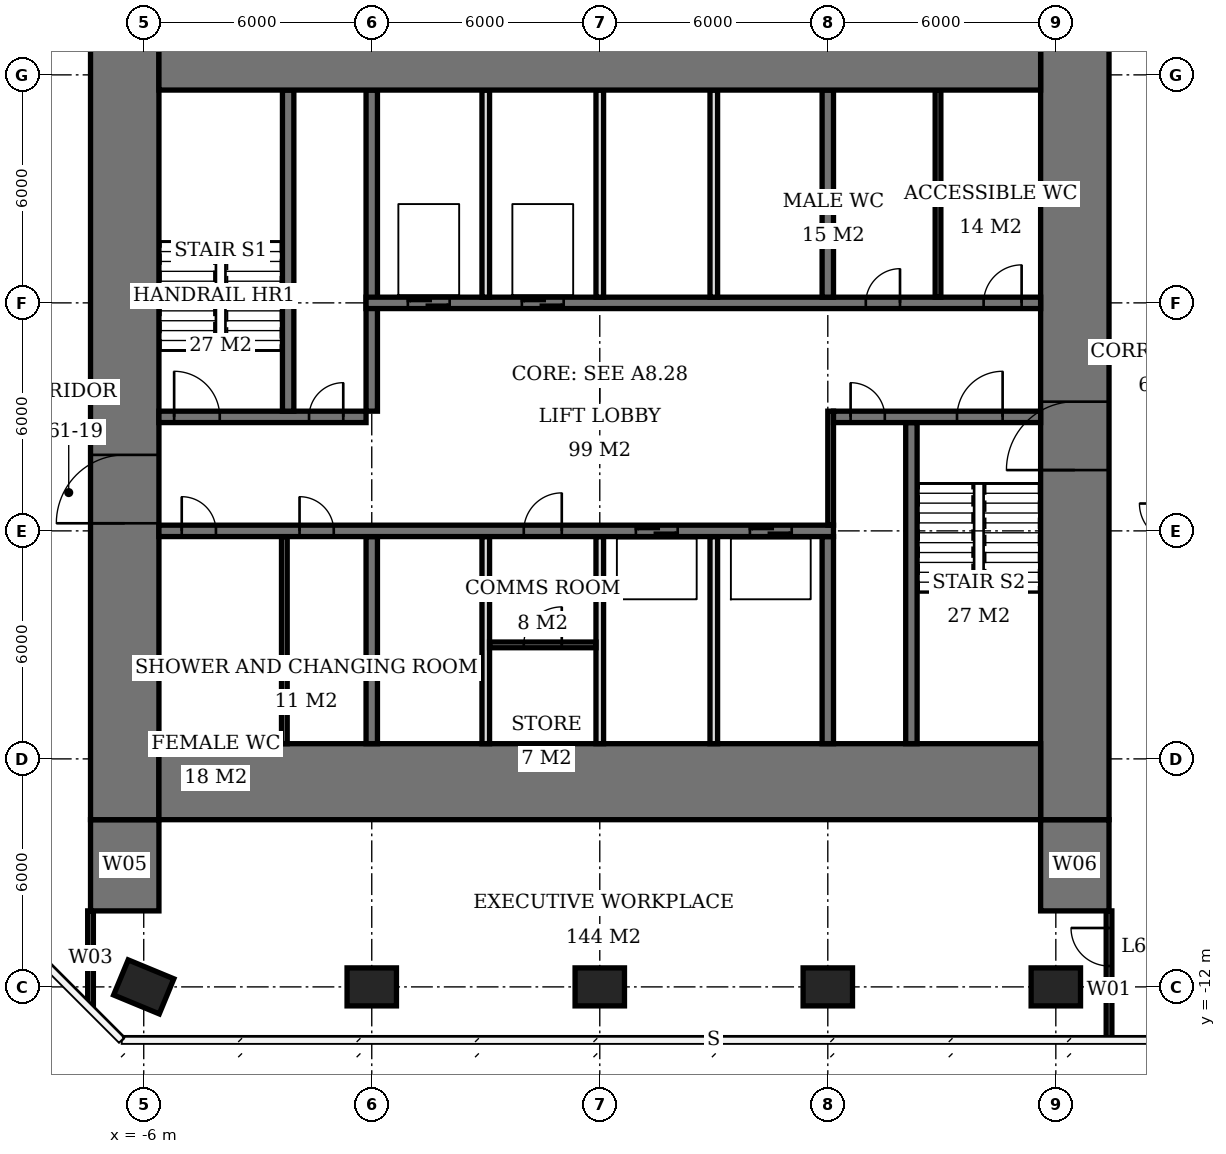
"""IFC4 building model, lengths in metres.
Left out: names, types, materials, properties, quantities, classifications, styles, units other than length and angle.
Written with IfcOpenShell. Run it as: python <this file> out.ifc"""

import sys

from ifc_helpers import new_model, si_unit, direction, frame, frame_2d, origin, origin_2d, place, context, subcontext, project, spatial, rectangle, extrude, element, fill, save


model = new_model("IFC4")
c1 = context("Model", 3, precision=1e-05, world=origin(), true_north=direction((0.0, 1.0)))
c2 = subcontext(c1, "Body", "Model", "MODEL_VIEW")
j1 = project(units=[si_unit("LENGTHUNIT", "METRE"), si_unit("PLANEANGLEUNIT", "RADIAN")], contexts=[c1])
p1 = place(None, origin())
s1 = spatial("IfcSite", under=j1, at=p1, CompositionType="ELEMENT")
p2 = place(p1, origin())
s2 = spatial("IfcBuilding", under=s1, at=p2, CompositionType="ELEMENT")
p3 = place(p2, frame((0.0, 0.0, 248.9)))
s3 = spatial("IfcBuildingStorey", under=s2, at=p3, CompositionType="ELEMENT", Elevation=248.9)
for number, where, z_axis, x_axis in (
    (1, (-6.0, -12.0, 0.0), (0.0, 0.0, 1.0), (-0.924, 0.383, 0.0)),
    (2, (0.0, -12.0, 0.0), (0.0, 0.0, 1.0), (1.0, 0.0, 0.0)),
    (3, (6.0, -12.0, 0.0), (0.0, 0.0, 1.0), (1.0, 0.0, 0.0)),
    (4, (12.0, -12.0, 0.0), (0.0, 0.0, 1.0), (1.0, 0.0, 0.0)),
    (5, (18.0, -12.0, 0.0), (0.0, 0.0, 1.0), (1.0, 0.0, 0.0)),
):
    element("IfcColumn", number, at=place(p3, frame(where, z_axis=z_axis, x_axis=x_axis)), inside=s3, PredefinedType="COLUMN", context=c2, shape_type="SweptSolid", body=[
        extrude(rectangle(XDim=1.3, YDim=1.0, at=origin_2d()), origin(), (0.0, 0.0, 1.0), 3.9),
    ])
for number, where, z_axis, x_axis in (
    (6, (-5.6, -6.6, 0.0), (0.0, 0.0, 1.0), (1.0, 0.0, 0.0)),
    (7, (-5.6, 12.6, 0.0), (0.0, 0.0, 1.0), (1.0, 0.0, 0.0)),
):
    element("IfcWall", number, at=place(p3, frame(where, z_axis=z_axis, x_axis=x_axis)), inside=s3, PredefinedType="SHEAR", context=c2, shape_type="SweptSolid", body=[
        extrude(rectangle(XDim=23.2, YDim=2.0, at=frame_2d((11.6, 0.0))), origin(), (0.0, 0.0, 1.0), 3.9),
    ])
p4 = place(p3, frame((-6.5, -7.6, 0.0), z_axis=(0.0, 0.0, 1.0), x_axis=(0.0, 1.0, 0.0)))
e8 = element("IfcWall", 8, at=p4, inside=s3, PredefinedType="SHEAR", context=c2, shape_type="SweptSolid", body=[
    extrude(rectangle(XDim=21.2, YDim=1.8, at=frame_2d((10.6, 0.0))), origin(), (0.0, 0.0, 1.0), 3.9),
])
p5 = place(p4, frame((7.8, 0.0, 0.0)))
e9 = element("IfcOpeningElement", 9, at=p5, cuts=e8, PredefinedType="OPENING", context=c2, shape_type="SweptSolid", body=[
    extrude(rectangle(XDim=1.8, YDim=2.4, at=frame_2d((0.9, 1.2))), frame((0.0, 0.91, 0.0), z_axis=(0.0, -1.0, 0.0), x_axis=(1.0, 0.0, 0.0)), (0.0, 0.0, 1.0), 1.82),
])
p6 = place(p3, frame((18.5, -7.6, 0.0), z_axis=(0.0, 0.0, 1.0), x_axis=(0.0, 1.0, 0.0)))
e10 = element("IfcWall", 10, at=p6, inside=s3, PredefinedType="SHEAR", context=c2, shape_type="SweptSolid", body=[
    extrude(rectangle(XDim=21.2, YDim=1.8, at=frame_2d((10.6, 0.0))), origin(), (0.0, 0.0, 1.0), 3.9),
])
p7 = place(p6, frame((9.2, 0.0, 0.0)))
e11 = element("IfcOpeningElement", 11, at=p7, cuts=e10, PredefinedType="OPENING", context=c2, shape_type="SweptSolid", body=[
    extrude(rectangle(XDim=1.8, YDim=2.4, at=frame_2d((0.9, 1.2))), frame((0.0, 0.91, 0.0), z_axis=(0.0, -1.0, 0.0), x_axis=(1.0, 0.0, 0.0)), (0.0, 0.0, 1.0), 1.82),
])
for number, where, z_axis, x_axis in (
    (12, (-6.5, -10.0, 0.0), (0.0, 0.0, 1.0), (0.0, 1.0, 0.0)),
    (13, (18.5, -10.0, 0.0), (0.0, 0.0, 1.0), (0.0, 1.0, 0.0)),
):
    element("IfcWall", number, at=place(p3, frame(where, z_axis=z_axis, x_axis=x_axis)), inside=s3, PredefinedType="SHEAR", context=c2, shape_type="SweptSolid", body=[
        extrude(rectangle(XDim=2.4, YDim=1.8, at=frame_2d((1.2, 0.0))), origin(), (0.0, 0.0, 1.0), 3.9),
    ])
p8 = place(p3, frame((-5.6, 0.0, 0.0), z_axis=(0.0, 0.0, 1.0), x_axis=(1.0, 0.0, 0.0)))
e14 = element("IfcWall", 14, at=p8, inside=s3, PredefinedType="SHEAR", context=c2, shape_type="SweptSolid", body=[
    extrude(rectangle(XDim=17.75, YDim=0.3, at=frame_2d((8.875, 0.0))), origin(), (0.0, 0.0, 1.0), 3.9),
])
p9 = place(p8, frame((0.6, 0.0, 0.0)))
e15 = element("IfcOpeningElement", 15, at=p9, cuts=e14, PredefinedType="OPENING", context=c2, shape_type="SweptSolid", body=[
    extrude(rectangle(XDim=0.9, YDim=2.1, at=frame_2d((0.45, 1.05))), frame((0.0, 0.16, 0.0), z_axis=(0.0, -1.0, 0.0), x_axis=(1.0, 0.0, 0.0)), (0.0, 0.0, 1.0), 0.32),
])
p10 = place(p8, frame((3.7, 0.0, 0.0)))
e16 = element("IfcOpeningElement", 16, at=p10, cuts=e14, PredefinedType="OPENING", context=c2, shape_type="SweptSolid", body=[
    extrude(rectangle(XDim=0.9, YDim=2.1, at=frame_2d((0.45, 1.05))), frame((0.0, 0.16, 0.0), z_axis=(0.0, -1.0, 0.0), x_axis=(1.0, 0.0, 0.0)), (0.0, 0.0, 1.0), 0.32),
])
p11 = place(p8, frame((9.6, 0.0, 0.0)))
e17 = element("IfcOpeningElement", 17, at=p11, cuts=e14, PredefinedType="OPENING", context=c2, shape_type="SweptSolid", body=[
    extrude(rectangle(XDim=1.0, YDim=2.1, at=frame_2d((0.5, 1.05))), frame((0.0, 0.16, 0.0), z_axis=(0.0, -1.0, 0.0), x_axis=(1.0, 0.0, 0.0)), (0.0, 0.0, 1.0), 0.32),
])
p12 = place(p8, frame((12.55, 0.0, 0.0)))
e18 = element("IfcOpeningElement", 18, at=p12, cuts=e14, PredefinedType="OPENING", context=c2, shape_type="SweptSolid", body=[
    extrude(rectangle(XDim=1.1, YDim=2.1, at=frame_2d((0.55, 1.05))), frame((0.0, 0.16, 0.0), z_axis=(0.0, -1.0, 0.0), x_axis=(1.0, 0.0, 0.0)), (0.0, 0.0, 1.0), 0.32),
])
p13 = place(p8, frame((15.55, 0.0, 0.0)))
e19 = element("IfcOpeningElement", 19, at=p13, cuts=e14, PredefinedType="OPENING", context=c2, shape_type="SweptSolid", body=[
    extrude(rectangle(XDim=1.1, YDim=2.1, at=frame_2d((0.55, 1.05))), frame((0.0, 0.16, 0.0), z_axis=(0.0, -1.0, 0.0), x_axis=(1.0, 0.0, 0.0)), (0.0, 0.0, 1.0), 0.32),
])
p14 = place(p3, frame((-5.6, 3.0, 0.0), z_axis=(0.0, 0.0, 1.0), x_axis=(1.0, 0.0, 0.0)))
e20 = element("IfcWall", 20, at=p14, inside=s3, PredefinedType="SHEAR", context=c2, shape_type="SweptSolid", body=[
    extrude(rectangle(XDim=5.45, YDim=0.3, at=frame_2d((2.725, 0.0))), origin(), (0.0, 0.0, 1.0), 3.9),
])
p15 = place(p14, frame((0.4, 0.0, 0.0)))
e21 = element("IfcOpeningElement", 21, at=p15, cuts=e20, PredefinedType="OPENING", context=c2, shape_type="SweptSolid", body=[
    extrude(rectangle(XDim=1.2, YDim=2.1, at=frame_2d((0.6, 1.05))), frame((0.0, 0.16, 0.0), z_axis=(0.0, -1.0, 0.0), x_axis=(1.0, 0.0, 0.0)), (0.0, 0.0, 1.0), 0.32),
])
p16 = place(p14, frame((3.95, 0.0, 0.0)))
e22 = element("IfcOpeningElement", 22, at=p16, cuts=e20, PredefinedType="OPENING", context=c2, shape_type="SweptSolid", body=[
    extrude(rectangle(XDim=0.9, YDim=2.1, at=frame_2d((0.45, 1.05))), frame((0.0, 0.16, 0.0), z_axis=(0.0, -1.0, 0.0), x_axis=(1.0, 0.0, 0.0)), (0.0, 0.0, 1.0), 0.32),
])
p17 = place(p3, frame((12.15, 3.0, 0.0), z_axis=(0.0, 0.0, 1.0), x_axis=(1.0, 0.0, 0.0)))
e23 = element("IfcWall", 23, at=p17, inside=s3, PredefinedType="SHEAR", context=c2, shape_type="SweptSolid", body=[
    extrude(rectangle(XDim=5.45, YDim=0.3, at=frame_2d((2.725, 0.0))), origin(), (0.0, 0.0, 1.0), 3.9),
])
p18 = place(p17, frame((3.25, 0.0, 0.0)))
e24 = element("IfcOpeningElement", 24, at=p18, cuts=e23, PredefinedType="OPENING", context=c2, shape_type="SweptSolid", body=[
    extrude(rectangle(XDim=1.2, YDim=2.1, at=frame_2d((0.6, 1.05))), frame((0.0, 0.16, 0.0), z_axis=(0.0, -1.0, 0.0), x_axis=(1.0, 0.0, 0.0)), (0.0, 0.0, 1.0), 0.32),
])
p19 = place(p17, frame((0.45, 0.0, 0.0)))
e25 = element("IfcOpeningElement", 25, at=p19, cuts=e23, PredefinedType="OPENING", context=c2, shape_type="SweptSolid", body=[
    extrude(rectangle(XDim=0.9, YDim=2.1, at=frame_2d((0.45, 1.05))), frame((0.0, 0.16, 0.0), z_axis=(0.0, -1.0, 0.0), x_axis=(1.0, 0.0, 0.0)), (0.0, 0.0, 1.0), 0.32),
])
p20 = place(p3, frame((-0.15, 6.0, 0.0), z_axis=(0.0, 0.0, 1.0), x_axis=(1.0, 0.0, 0.0)))
e26 = element("IfcWall", 26, at=p20, inside=s3, PredefinedType="SHEAR", context=c2, shape_type="SweptSolid", body=[
    extrude(rectangle(XDim=17.75, YDim=0.3, at=frame_2d((8.875, 0.0))), origin(), (0.0, 0.0, 1.0), 3.9),
])
p21 = place(p20, frame((13.15, 0.0, 0.0)))
e27 = element("IfcOpeningElement", 27, at=p21, cuts=e26, PredefinedType="OPENING", context=c2, shape_type="SweptSolid", body=[
    extrude(rectangle(XDim=0.9, YDim=2.1, at=frame_2d((0.45, 1.05))), frame((0.0, 0.16, 0.0), z_axis=(0.0, -1.0, 0.0), x_axis=(1.0, 0.0, 0.0)), (0.0, 0.0, 1.0), 0.32),
])
p22 = place(p20, frame((16.25, 0.0, 0.0)))
e28 = element("IfcOpeningElement", 28, at=p22, cuts=e26, PredefinedType="OPENING", context=c2, shape_type="SweptSolid", body=[
    extrude(rectangle(XDim=1.0, YDim=2.1, at=frame_2d((0.5, 1.05))), frame((0.0, 0.16, 0.0), z_axis=(0.0, -1.0, 0.0), x_axis=(1.0, 0.0, 0.0)), (0.0, 0.0, 1.0), 0.32),
])
p23 = place(p20, frame((1.1, 0.0, 0.0)))
e29 = element("IfcOpeningElement", 29, at=p23, cuts=e26, PredefinedType="OPENING", context=c2, shape_type="SweptSolid", body=[
    extrude(rectangle(XDim=1.1, YDim=2.1, at=frame_2d((0.55, 1.05))), frame((0.0, 0.16, 0.0), z_axis=(0.0, -1.0, 0.0), x_axis=(1.0, 0.0, 0.0)), (0.0, 0.0, 1.0), 0.32),
])
p24 = place(p20, frame((4.1, 0.0, 0.0)))
e30 = element("IfcOpeningElement", 30, at=p24, cuts=e26, PredefinedType="OPENING", context=c2, shape_type="SweptSolid", body=[
    extrude(rectangle(XDim=1.1, YDim=2.1, at=frame_2d((0.55, 1.05))), frame((0.0, 0.16, 0.0), z_axis=(0.0, -1.0, 0.0), x_axis=(1.0, 0.0, 0.0)), (0.0, 0.0, 1.0), 0.32),
])
p25 = place(p3, frame((0.0, -5.6, 0.0), z_axis=(0.0, 0.0, 1.0), x_axis=(0.0, 1.0, 0.0)))
e31 = element("IfcWall", 31, at=p25, inside=s3, PredefinedType="SHEAR", context=c2, shape_type="SweptSolid", body=[
    extrude(rectangle(XDim=5.45, YDim=0.3, at=frame_2d((2.725, 0.0))), origin(), (0.0, 0.0, 1.0), 3.9),
])
p26 = place(p3, frame((0.0, 3.15, 0.0), z_axis=(0.0, 0.0, 1.0), x_axis=(0.0, 1.0, 0.0)))
e32 = element("IfcWall", 32, at=p26, inside=s3, PredefinedType="SHEAR", context=c2, shape_type="SweptSolid", body=[
    extrude(rectangle(XDim=8.45, YDim=0.3, at=frame_2d((4.225, 0.0))), origin(), (0.0, 0.0, 1.0), 3.9),
])
for number, where, z_axis, x_axis in (
    (33, (12.0, -5.6, 0.0), (0.0, 0.0, 1.0), (0.0, 1.0, 0.0)),
    (34, (12.0, 6.15, 0.0), (0.0, 0.0, 1.0), (0.0, 1.0, 0.0)),
):
    element("IfcWall", number, at=place(p3, frame(where, z_axis=z_axis, x_axis=x_axis)), inside=s3, PredefinedType="SHEAR", context=c2, shape_type="SweptSolid", body=[
        extrude(rectangle(XDim=5.45, YDim=0.3, at=frame_2d((2.725, 0.0))), origin(), (0.0, 0.0, 1.0), 3.9),
    ])
for number, where, z_axis, x_axis in (
    (35, (-2.2, 3.15, 0.0), (0.0, 0.0, 1.0), (0.0, 1.0, 0.0)),
    (36, (14.2, -5.6, 0.0), (0.0, 0.0, 1.0), (0.0, 1.0, 0.0)),
):
    element("IfcWall", number, at=place(p3, frame(where, z_axis=z_axis, x_axis=x_axis)), inside=s3, PredefinedType="SHEAR", context=c2, shape_type="SweptSolid", body=[
        extrude(rectangle(XDim=8.45, YDim=0.3, at=frame_2d((4.225, 0.0))), origin(), (0.0, 0.0, 1.0), 3.9),
    ])
for number, where, z_axis, x_axis in (
    (37, (3.0, 6.15, 0.0), (0.0, 0.0, 1.0), (0.0, 1.0, 0.0)),
    (38, (6.0, 6.15, 0.0), (0.0, 0.0, 1.0), (0.0, 1.0, 0.0)),
    (39, (9.0, 6.15, 0.0), (0.0, 0.0, 1.0), (0.0, 1.0, 0.0)),
    (40, (3.0, -5.6, 0.0), (0.0, 0.0, 1.0), (0.0, 1.0, 0.0)),
    (41, (6.0, -5.6, 0.0), (0.0, 0.0, 1.0), (0.0, 1.0, 0.0)),
    (42, (9.0, -5.6, 0.0), (0.0, 0.0, 1.0), (0.0, 1.0, 0.0)),
):
    element("IfcWall", number, at=place(p3, frame(where, z_axis=z_axis, x_axis=x_axis)), inside=s3, PredefinedType="SOLIDWALL", context=c2, shape_type="SweptSolid", body=[
        extrude(rectangle(XDim=5.45, YDim=0.2, at=frame_2d((2.725, 0.0))), origin(), (0.0, 0.0, 1.0), 3.9),
    ])
for number, where, z_axis, x_axis in (
    (43, (-2.3, -5.6, 0.0), (0.0, 0.0, 1.0), (0.0, 1.0, 0.0)),
    (44, (14.9, 6.15, 0.0), (0.0, 0.0, 1.0), (0.0, 1.0, 0.0)),
):
    element("IfcWall", number, at=place(p3, frame(where, z_axis=z_axis, x_axis=x_axis)), inside=s3, PredefinedType="PLUMBINGWALL", context=c2, shape_type="SweptSolid", body=[
        extrude(rectangle(XDim=5.45, YDim=0.15, at=frame_2d((2.725, 0.0))), origin(), (0.0, 0.0, 1.0), 3.65),
    ])
p27 = place(p3, frame((3.1, -3.0, 0.0), z_axis=(0.0, 0.0, 1.0), x_axis=(1.0, 0.0, 0.0)))
e45 = element("IfcWall", 45, at=p27, inside=s3, PredefinedType="PARTITIONING", context=c2, shape_type="SweptSolid", body=[
    extrude(rectangle(XDim=2.8, YDim=0.15, at=frame_2d((1.4, 0.0))), origin(), (0.0, 0.0, 1.0), 3.65),
])
p28 = place(p27, frame((0.9, 0.0, 0.0)))
e46 = element("IfcOpeningElement", 46, at=p28, cuts=e45, PredefinedType="OPENING", context=c2, shape_type="SweptSolid", body=[
    extrude(rectangle(XDim=1.0, YDim=2.1, at=frame_2d((0.5, 1.05))), frame((0.0, 0.085, 0.0), z_axis=(0.0, -1.0, 0.0), x_axis=(1.0, 0.0, 0.0)), (0.0, 0.0, 1.0), 0.17),
])
p29 = place(p3, frame((-7.4, -12.464, 0.0), z_axis=(0.0, 0.0, 1.0), x_axis=(0.0, 1.0, 0.0)))
e47 = element("IfcWall", 47, at=p29, inside=s3, PredefinedType="PARTITIONING", context=c2, shape_type="SweptSolid", body=[
    extrude(rectangle(XDim=2.464, YDim=0.15, at=frame_2d((1.232, 0.0))), origin(), (0.0, 0.0, 1.0), 3.65),
])
p30 = place(p3, frame((19.4, -13.375, 0.0), z_axis=(0.0, 0.0, 1.0), x_axis=(0.0, 1.0, 0.0)))
e48 = element("IfcWall", 48, at=p30, inside=s3, PredefinedType="PARTITIONING", context=c2, shape_type="SweptSolid", body=[
    extrude(rectangle(XDim=3.375, YDim=0.15, at=frame_2d((1.688, 0.0))), origin(), (0.0, 0.0, 1.0), 3.65),
])
p31 = place(p30, frame((1.925, 0.0, 0.0)))
e49 = element("IfcOpeningElement", 49, at=p31, cuts=e48, PredefinedType="OPENING", context=c2, shape_type="SweptSolid", body=[
    extrude(rectangle(XDim=1.0, YDim=2.1, at=frame_2d((0.5, 1.05))), frame((0.0, 0.085, 0.0), z_axis=(0.0, -1.0, 0.0), x_axis=(1.0, 0.0, 0.0)), (0.0, 0.0, 1.0), 0.17),
])
p32 = place(p3, frame((12.075, 0.15, 0.0), z_axis=(0.0, 0.0, 1.0), x_axis=(0.0, 1.0, 0.0)))
e50 = element("IfcWall", 50, at=p32, inside=s3, PredefinedType="PARTITIONING", context=c2, shape_type="SweptSolid", body=[
    extrude(rectangle(XDim=3.0, YDim=0.15, at=frame_2d((1.5, 0.0))), origin(), (0.0, 0.0, 1.0), 3.65),
])
p33 = place(p5, origin())
e51 = element("IfcDoor", 51, at=p33, inside=s3, OperationType="DOUBLE_DOOR_SINGLE_SWING", PredefinedType="DOOR", context=c2, shape_type="SweptSolid", body=[
    extrude(rectangle(XDim=1.8, YDim=2.4, at=frame_2d((0.9, 1.2))), frame((0.0, 0.025, 0.0), z_axis=(0.0, -1.0, 0.0), x_axis=(1.0, 0.0, 0.0)), (0.0, 0.0, 1.0), 0.05),
])
fill(e9, e51)
p34 = place(p7, origin())
e52 = element("IfcDoor", 52, at=p34, inside=s3, OperationType="DOUBLE_DOOR_SINGLE_SWING", PredefinedType="DOOR", context=c2, shape_type="SweptSolid", body=[
    extrude(rectangle(XDim=1.8, YDim=2.4, at=frame_2d((0.9, 1.2))), frame((0.0, 0.025, 0.0), z_axis=(0.0, -1.0, 0.0), x_axis=(1.0, 0.0, 0.0)), (0.0, 0.0, 1.0), 0.05),
])
fill(e11, e52)
p35 = place(p15, origin())
e53 = element("IfcDoor", 53, at=p35, inside=s3, OperationType="SINGLE_SWING_LEFT", PredefinedType="DOOR", context=c2, shape_type="SweptSolid", body=[
    extrude(rectangle(XDim=1.2, YDim=2.1, at=frame_2d((0.6, 1.05))), frame((0.0, 0.025, 0.0), z_axis=(0.0, -1.0, 0.0), x_axis=(1.0, 0.0, 0.0)), (0.0, 0.0, 1.0), 0.05),
])
fill(e21, e53)
p36 = place(p16, origin())
e54 = element("IfcDoor", 54, at=p36, inside=s3, OperationType="SINGLE_SWING_RIGHT", PredefinedType="DOOR", context=c2, shape_type="SweptSolid", body=[
    extrude(rectangle(XDim=0.9, YDim=2.1, at=frame_2d((0.45, 1.05))), frame((0.0, 0.025, 0.0), z_axis=(0.0, -1.0, 0.0), x_axis=(1.0, 0.0, 0.0)), (0.0, 0.0, 1.0), 0.05),
])
fill(e22, e54)
p37 = place(p18, origin())
e55 = element("IfcDoor", 55, at=p37, inside=s3, OperationType="SINGLE_SWING_RIGHT", PredefinedType="DOOR", context=c2, shape_type="SweptSolid", body=[
    extrude(rectangle(XDim=1.2, YDim=2.1, at=frame_2d((0.6, 1.05))), frame((0.0, 0.025, 0.0), z_axis=(0.0, -1.0, 0.0), x_axis=(1.0, 0.0, 0.0)), (0.0, 0.0, 1.0), 0.05),
])
fill(e24, e55)
p38 = place(p19, origin())
e56 = element("IfcDoor", 56, at=p38, inside=s3, OperationType="SINGLE_SWING_LEFT", PredefinedType="DOOR", context=c2, shape_type="SweptSolid", body=[
    extrude(rectangle(XDim=0.9, YDim=2.1, at=frame_2d((0.45, 1.05))), frame((0.0, 0.025, 0.0), z_axis=(0.0, -1.0, 0.0), x_axis=(1.0, 0.0, 0.0)), (0.0, 0.0, 1.0), 0.05),
])
fill(e25, e56)
p39 = place(p9, origin())
e57 = element("IfcDoor", 57, at=p39, inside=s3, OperationType="SINGLE_SWING_LEFT", PredefinedType="DOOR", context=c2, shape_type="SweptSolid", body=[
    extrude(rectangle(XDim=0.9, YDim=2.1, at=frame_2d((0.45, 1.05))), frame((0.0, 0.025, 0.0), z_axis=(0.0, -1.0, 0.0), x_axis=(1.0, 0.0, 0.0)), (0.0, 0.0, 1.0), 0.05),
])
fill(e15, e57)
p40 = place(p10, origin())
e58 = element("IfcDoor", 58, at=p40, inside=s3, OperationType="SINGLE_SWING_LEFT", PredefinedType="DOOR", context=c2, shape_type="SweptSolid", body=[
    extrude(rectangle(XDim=0.9, YDim=2.1, at=frame_2d((0.45, 1.05))), frame((0.0, 0.025, 0.0), z_axis=(0.0, -1.0, 0.0), x_axis=(1.0, 0.0, 0.0)), (0.0, 0.0, 1.0), 0.05),
])
fill(e16, e58)
p41 = place(p21, origin())
e59 = element("IfcDoor", 59, at=p41, inside=s3, OperationType="SINGLE_SWING_RIGHT", PredefinedType="DOOR", context=c2, shape_type="SweptSolid", body=[
    extrude(rectangle(XDim=0.9, YDim=2.1, at=frame_2d((0.45, 1.05))), frame((0.0, 0.025, 0.0), z_axis=(0.0, -1.0, 0.0), x_axis=(1.0, 0.0, 0.0)), (0.0, 0.0, 1.0), 0.05),
])
fill(e27, e59)
p42 = place(p22, origin())
e60 = element("IfcDoor", 60, at=p42, inside=s3, OperationType="SINGLE_SWING_RIGHT", PredefinedType="DOOR", context=c2, shape_type="SweptSolid", body=[
    extrude(rectangle(XDim=1.0, YDim=2.1, at=frame_2d((0.5, 1.05))), frame((0.0, 0.025, 0.0), z_axis=(0.0, -1.0, 0.0), x_axis=(1.0, 0.0, 0.0)), (0.0, 0.0, 1.0), 0.05),
])
fill(e28, e60)
p43 = place(p28, origin())
e61 = element("IfcDoor", 61, at=p43, inside=s3, OperationType="SINGLE_SWING_RIGHT", PredefinedType="DOOR", context=c2, shape_type="SweptSolid", body=[
    extrude(rectangle(XDim=1.0, YDim=2.1, at=frame_2d((0.5, 1.05))), frame((0.0, 0.025, 0.0), z_axis=(0.0, -1.0, 0.0), x_axis=(1.0, 0.0, 0.0)), (0.0, 0.0, 1.0), 0.05),
])
fill(e46, e61)
p44 = place(p11, origin())
e62 = element("IfcDoor", 62, at=p44, inside=s3, OperationType="SINGLE_SWING_RIGHT", PredefinedType="DOOR", context=c2, shape_type="SweptSolid", body=[
    extrude(rectangle(XDim=1.0, YDim=2.1, at=frame_2d((0.5, 1.05))), frame((0.0, 0.025, 0.0), z_axis=(0.0, -1.0, 0.0), x_axis=(1.0, 0.0, 0.0)), (0.0, 0.0, 1.0), 0.05),
])
fill(e17, e62)
p45 = place(p23, origin())
e63 = element("IfcDoor", 63, at=p45, inside=s3, OperationType="DOUBLE_DOOR_SLIDING", PredefinedType="USERDEFINED", context=c2, shape_type="SweptSolid", body=[
    extrude(rectangle(XDim=1.1, YDim=2.1, at=frame_2d((0.55, 1.05))), frame((0.0, 0.025, 0.0), z_axis=(0.0, -1.0, 0.0), x_axis=(1.0, 0.0, 0.0)), (0.0, 0.0, 1.0), 0.05),
])
fill(e29, e63)
p46 = place(p24, origin())
e64 = element("IfcDoor", 64, at=p46, inside=s3, OperationType="DOUBLE_DOOR_SLIDING", PredefinedType="USERDEFINED", context=c2, shape_type="SweptSolid", body=[
    extrude(rectangle(XDim=1.1, YDim=2.1, at=frame_2d((0.55, 1.05))), frame((0.0, 0.025, 0.0), z_axis=(0.0, -1.0, 0.0), x_axis=(1.0, 0.0, 0.0)), (0.0, 0.0, 1.0), 0.05),
])
fill(e30, e64)
p47 = place(p12, origin())
e65 = element("IfcDoor", 65, at=p47, inside=s3, OperationType="DOUBLE_DOOR_SLIDING", PredefinedType="USERDEFINED", context=c2, shape_type="SweptSolid", body=[
    extrude(rectangle(XDim=1.1, YDim=2.1, at=frame_2d((0.55, 1.05))), frame((0.0, 0.025, 0.0), z_axis=(0.0, -1.0, 0.0), x_axis=(1.0, 0.0, 0.0)), (0.0, 0.0, 1.0), 0.05),
])
fill(e18, e65)
p48 = place(p13, origin())
e66 = element("IfcDoor", 66, at=p48, inside=s3, OperationType="DOUBLE_DOOR_SLIDING", PredefinedType="USERDEFINED", context=c2, shape_type="SweptSolid", body=[
    extrude(rectangle(XDim=1.1, YDim=2.1, at=frame_2d((0.55, 1.05))), frame((0.0, 0.025, 0.0), z_axis=(0.0, -1.0, 0.0), x_axis=(1.0, 0.0, 0.0)), (0.0, 0.0, 1.0), 0.05),
])
fill(e19, e66)
p49 = place(p31, origin())
e67 = element("IfcDoor", 67, at=p49, inside=s3, OperationType="SINGLE_SWING_RIGHT", PredefinedType="DOOR", context=c2, shape_type="SweptSolid", body=[
    extrude(rectangle(XDim=1.0, YDim=2.1, at=frame_2d((0.5, 1.05))), frame((0.0, 0.025, 0.0), z_axis=(0.0, -1.0, 0.0), x_axis=(1.0, 0.0, 0.0)), (0.0, 0.0, 1.0), 0.05),
])
fill(e49, e67)
save(model, sys.argv[1])
